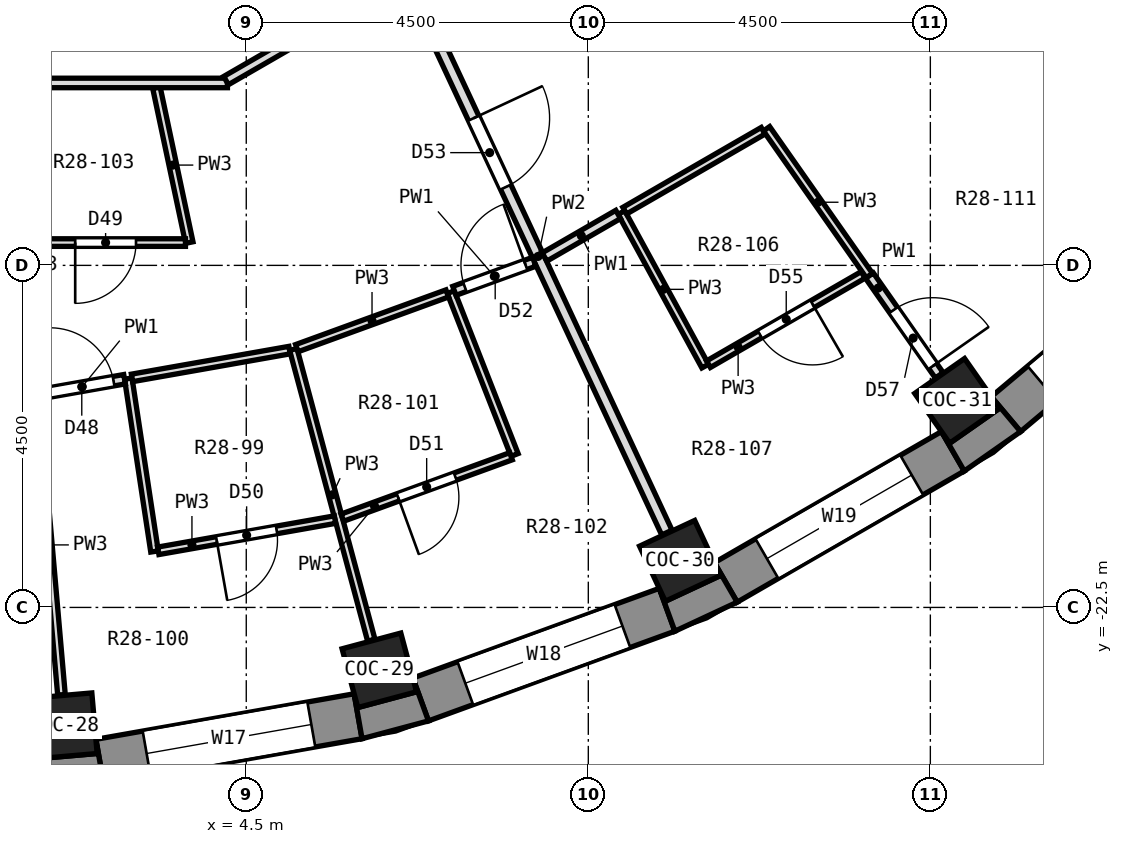
"""IFC4 building model, lengths in metres.
Left out: names, types, materials, properties, quantities, classifications, styles, units other than length and angle.
Written with IfcOpenShell. Run it as: python <this file> out.ifc"""

import sys

from ifc_helpers import new_model, si_unit, direction, frame, frame_2d, origin, origin_2d, place, context, subcontext, project, spatial, polyline, rectangle, outline, extrude, element, fill, save


model = new_model("IFC4")
c1 = context("Model", 3, precision=1e-05, world=origin(), true_north=direction((0.0, 1.0)))
c2 = subcontext(c1, "Body", "Model", "MODEL_VIEW")
j1 = project(units=[si_unit("LENGTHUNIT", "METRE"), si_unit("PLANEANGLEUNIT", "RADIAN")], contexts=[c1])
p1 = place(None, origin())
s1 = spatial("IfcSite", under=j1, at=p1, CompositionType="ELEMENT")
p2 = place(p1, origin())
s2 = spatial("IfcBuilding", under=s1, at=p2, CompositionType="ELEMENT")
p3 = place(p2, frame((0.0, 0.0, 190.5)))
s3 = spatial("IfcBuildingStorey", under=s2, at=p3, CompositionType="ELEMENT", Elevation=190.5)
for number, where, z_axis, x_axis in (
    (1, (2.105, -24.058, 0.0), (0.0, 0.0, 1.0), (0.087, -0.996, 0.0)),
    (2, (6.25, -23.327, 0.0), (0.0, 0.0, 1.0), (0.259, -0.966, 0.0)),
    (3, (10.206, -21.887, 0.0), (0.0, 0.0, 1.0), (0.423, -0.906, 0.0)),
    (4, (13.852, -19.782, 0.0), (0.0, 0.0, 1.0), (0.574, -0.819, 0.0)),
):
    element("IfcColumn", number, at=place(p3, frame(where, z_axis=z_axis, x_axis=x_axis)), inside=s3, PredefinedType="COLUMN", context=c2, shape_type="SweptSolid", body=[
        extrude(rectangle(XDim=0.8, YDim=0.8, at=origin_2d()), origin(), (0.0, 0.0, 1.0), 3.3),
    ])
p4 = place(p3, frame((2.574, -24.531, 0.0), z_axis=(0.0, 0.0, 1.0), x_axis=(0.984814892183, 0.173607684551, 0.0)))
e5 = element("IfcWall", 5, at=p4, inside=s3, PredefinedType="SOLIDWALL", context=c2, shape_type="SweptSolid", body=[
    extrude(rectangle(XDim=3.45, YDim=0.6, at=frame_2d((1.725, 0.0))), origin(), (0.0, 0.0, 1.0), 2.85),
])
p5 = place(p4, frame((0.625, 0.0, 0.9)))
e6 = element("IfcOpeningElement", 6, at=p5, cuts=e5, PredefinedType="OPENING", context=c2, shape_type="SweptSolid", body=[
    extrude(rectangle(XDim=2.2, YDim=1.8, at=frame_2d((1.1, 0.9))), frame((0.0, 0.312, 0.0), z_axis=(0.0, -1.0, 0.0), x_axis=(1.0, 0.0, 0.0)), (0.0, 0.0, 1.0), 0.624),
])
p6 = place(p3, frame((6.794, -23.711, 0.0), z_axis=(0.0, 0.0, 1.0), x_axis=(0.93968799822, 0.342032843455, 0.0)))
e7 = element("IfcWall", 7, at=p6, inside=s3, PredefinedType="SOLIDWALL", context=c2, shape_type="SweptSolid", body=[
    extrude(rectangle(XDim=3.45, YDim=0.6, at=frame_2d((1.725, 0.0))), origin(), (0.0, 0.0, 1.0), 2.85),
])
p7 = place(p6, frame((0.625, 0.0, 0.9)))
e8 = element("IfcOpeningElement", 8, at=p7, cuts=e7, PredefinedType="OPENING", context=c2, shape_type="SweptSolid", body=[
    extrude(rectangle(XDim=2.2, YDim=1.8, at=frame_2d((1.1, 0.9))), frame((0.0, 0.312, 0.0), z_axis=(0.0, -1.0, 0.0), x_axis=(1.0, 0.0, 0.0)), (0.0, 0.0, 1.0), 0.624),
])
p8 = place(p3, frame((10.809, -22.171, 0.0), z_axis=(0.0, 0.0, 1.0), x_axis=(0.86602648383, 0.499998129301, 0.0)))
e9 = element("IfcWall", 9, at=p8, inside=s3, PredefinedType="SOLIDWALL", context=c2, shape_type="SweptSolid", body=[
    extrude(rectangle(XDim=3.45, YDim=0.6, at=frame_2d((1.725, 0.0))), origin(), (0.0, 0.0, 1.0), 2.85),
])
p9 = place(p8, frame((0.625, 0.0, 0.9)))
e10 = element("IfcOpeningElement", 10, at=p9, cuts=e9, PredefinedType="OPENING", context=c2, shape_type="SweptSolid", body=[
    extrude(rectangle(XDim=2.2, YDim=1.8, at=frame_2d((1.1, 0.9))), frame((0.0, 0.312, 0.0), z_axis=(0.0, -1.0, 0.0), x_axis=(1.0, 0.0, 0.0)), (0.0, 0.0, 1.0), 0.624),
])
p10 = place(p3, frame((14.494, -19.957, 0.0), z_axis=(0.0, 0.0, 1.0), x_axis=(0.766058884809, 0.642770398358, 0.0)))
e11 = element("IfcWall", 11, at=p10, inside=s3, PredefinedType="SOLIDWALL", context=c2, shape_type="SweptSolid", body=[
    extrude(rectangle(XDim=3.449, YDim=0.6, at=frame_2d((1.725, 0.0))), origin(), (0.0, 0.0, 1.0), 2.85),
])
p11 = place(p10, frame((0.625, 0.0, 0.9)))
e12 = element("IfcOpeningElement", 12, at=p11, cuts=e11, PredefinedType="OPENING", context=c2, shape_type="SweptSolid", body=[
    extrude(rectangle(XDim=2.2, YDim=1.8, at=frame_2d((1.1, 0.9))), frame((0.0, 0.312, 0.0), z_axis=(0.0, -1.0, 0.0), x_axis=(1.0, 0.0, 0.0)), (0.0, 0.0, 1.0), 0.624),
])
p12 = place(p3, origin())
e13 = element("IfcWall", 13, at=p12, inside=s3, PredefinedType="SOLIDWALL", context=c2, shape_type="SweptSolid", body=[
    extrude(outline(polyline([(1.725, -24.905), (2.626, -24.826), (2.522, -24.235), (2.538, -24.422), (1.741, -24.491), (1.725, -24.305), (1.725, -24.905)])), origin(), (0.0, 0.0, 1.0), 2.85),
])
p13 = place(p3, origin())
e14 = element("IfcWall", 14, at=p13, inside=s3, PredefinedType="SOLIDWALL", context=c2, shape_type="SweptSolid", body=[
    extrude(outline(polyline([(6.023, -24.227), (6.897, -23.993), (6.692, -23.429), (6.74, -23.61), (5.968, -23.817), (5.919, -23.636), (6.023, -24.227)])), origin(), (0.0, 0.0, 1.0), 2.85),
])
p14 = place(p3, origin())
e15 = element("IfcWall", 15, at=p14, inside=s3, PredefinedType="SOLIDWALL", context=c2, shape_type="SweptSolid", body=[
    extrude(outline(polyline([(10.959, -22.431), (10.659, -21.911), (10.738, -22.081), (10.013, -22.419), (9.934, -22.249), (10.139, -22.813), (10.959, -22.431)])), origin(), (0.0, 0.0, 1.0), 2.85),
])
p15 = place(p3, origin())
e16 = element("IfcWall", 16, at=p15, inside=s3, PredefinedType="SOLIDWALL", context=c2, shape_type="SweptSolid", body=[
    extrude(outline(polyline([(13.946, -20.706), (14.687, -20.187), (14.302, -19.727), (14.409, -19.881), (13.754, -20.34), (13.646, -20.186), (13.946, -20.706)])), origin(), (0.0, 0.0, 1.0), 2.85),
])
p16 = place(p3, frame((1.724, -19.705, 0.0), z_axis=(0.0, 0.0, 1.0), x_axis=(0.087060633562, -0.996203014492, 0.0)))
e17 = element("IfcWall", 17, at=p16, inside=s3, PredefinedType="PARTITIONING", context=c2, shape_type="SweptSolid", body=[
    extrude(rectangle(XDim=3.96, YDim=0.1, at=frame_2d((1.98, 0.0))), origin(), (0.0, 0.0, 1.0), 2.85),
])
p17 = place(p3, frame((2.948, -19.489, 0.0), z_axis=(0.0, 0.0, 1.0), x_axis=(0.149927962289, -0.98869692329, 0.0)))
e18 = element("IfcWall", 18, at=p17, inside=s3, PredefinedType="PARTITIONING", context=c2, shape_type="SweptSolid", body=[
    extrude(rectangle(XDim=2.301, YDim=0.1, at=frame_2d((1.15, 0.0))), origin(), (0.0, 0.0, 1.0), 2.85),
])
p18 = place(p3, frame((3.318, -15.661, 0.0), z_axis=(0.0, 0.0, 1.0), x_axis=(0.207344548251, -0.978267978782, 0.0)))
e19 = element("IfcWall", 19, at=p18, inside=s3, PredefinedType="PARTITIONING", context=c2, shape_type="SweptSolid", body=[
    extrude(rectangle(XDim=2.084, YDim=0.1, at=frame_2d((1.042, 0.0))), origin(), (0.0, 0.0, 1.0), 2.85),
])
p19 = place(p3, frame((5.119, -19.106, 0.0), z_axis=(0.0, 0.0, 1.0), x_axis=(0.259051417791, -0.965863532255, 0.0)))
e20 = element("IfcWall", 20, at=p19, inside=s3, PredefinedType="PARTITIONING", context=c2, shape_type="SweptSolid", body=[
    extrude(rectangle(XDim=3.96, YDim=0.1, at=frame_2d((1.98, 0.0))), origin(), (0.0, 0.0, 1.0), 2.85),
])
p20 = place(p3, frame((7.191, -18.352, 0.0), z_axis=(0.0, 0.0, 1.0), x_axis=(0.364775478286, -0.931095510912, 0.0)))
e21 = element("IfcWall", 21, at=p20, inside=s3, PredefinedType="PARTITIONING", context=c2, shape_type="SweptSolid", body=[
    extrude(rectangle(XDim=2.3, YDim=0.1, at=frame_2d((1.15, 0.0))), origin(), (0.0, 0.0, 1.0), 2.85),
])
p21 = place(p3, frame((6.645, -14.249, 0.0), z_axis=(0.0, 0.0, 1.0), x_axis=(0.422700425591, -0.90626946887, 0.0)))
e22 = element("IfcWall", 22, at=p21, inside=s3, PredefinedType="PARTITIONING", context=c2, shape_type="SweptSolid", body=[
    extrude(rectangle(XDim=8.018, YDim=0.15, at=frame_2d((4.009, 0.0))), origin(), (0.0, 0.0, 1.0), 2.85),
])
p22 = place(p21, frame((2.002, 0.0, 0.0)))
e23 = element("IfcOpeningElement", 23, at=p22, cuts=e22, PredefinedType="OPENING", context=c2, shape_type="SweptSolid", body=[
    extrude(rectangle(XDim=1.0, YDim=2.1, at=frame_2d((0.5, 1.05))), frame((0.0, 0.087, 0.0), z_axis=(0.0, -1.0, 0.0), x_axis=(1.0, 0.0, 0.0)), (0.0, 0.0, 1.0), 0.174),
])
p23 = place(p3, frame((9.436, -17.305, 0.0), z_axis=(0.0, 0.0, 1.0), x_axis=(0.478926465157, -0.877855022753, 0.0)))
e24 = element("IfcWall", 24, at=p23, inside=s3, PredefinedType="PARTITIONING", context=c2, shape_type="SweptSolid", body=[
    extrude(rectangle(XDim=2.301, YDim=0.1, at=frame_2d((1.15, 0.0))), origin(), (0.0, 0.0, 1.0), 2.85),
])
p24 = place(p3, frame((11.345, -16.203, 0.0), z_axis=(0.0, 0.0, 1.0), x_axis=(0.573823443789, -0.818979032307, 0.0)))
e25 = element("IfcWall", 25, at=p24, inside=s3, PredefinedType="PARTITIONING", context=c2, shape_type="SweptSolid", body=[
    extrude(rectangle(XDim=2.359, YDim=0.1, at=frame_2d((1.18, 0.0))), origin(), (0.0, 0.0, 1.0), 2.85),
])
p25 = place(p3, frame((12.699, -18.135, 0.0), z_axis=(0.0, 0.0, 1.0), x_axis=(0.57352374907, -0.819188933795, 0.0)))
e26 = element("IfcWall", 26, at=p25, inside=s3, PredefinedType="PARTITIONING", context=c2, shape_type="SweptSolid", body=[
    extrude(rectangle(XDim=1.601, YDim=0.125, at=frame_2d((0.801, 0.0))), origin(), (0.0, 0.0, 1.0), 2.85),
])
p26 = place(p25, frame((0.553, 0.0, 0.0)))
e27 = element("IfcOpeningElement", 27, at=p26, cuts=e26, PredefinedType="OPENING", context=c2, shape_type="SweptSolid", body=[
    extrude(rectangle(XDim=0.9, YDim=2.1, at=frame_2d((0.45, 1.05))), frame((0.0, 0.074, 0.0), z_axis=(0.0, -1.0, 0.0), x_axis=(1.0, 0.0, 0.0)), (0.0, 0.0, 1.0), 0.149),
])
p27 = place(p3, frame((13.987, -13.987, 0.0), z_axis=(0.0, 0.0, 1.0), x_axis=(0.707106781187, -0.707106781187, 0.0)))
e28 = element("IfcWall", 28, at=p27, inside=s3, PredefinedType="PARTITIONING", context=c2, shape_type="SweptSolid", body=[
    extrude(rectangle(XDim=3.959, YDim=0.125, at=frame_2d((1.979, 0.0))), origin(), (0.0, 0.0, 1.0), 2.85),
])
p28 = place(p27, frame((1.859, 0.0, 0.0)))
e29 = element("IfcOpeningElement", 29, at=p28, cuts=e28, PredefinedType="OPENING", context=c2, shape_type="SweptSolid", body=[
    extrude(rectangle(XDim=0.9, YDim=2.1, at=frame_2d((0.45, 1.05))), frame((0.0, 0.074, 0.0), z_axis=(0.0, -1.0, 0.0), x_axis=(1.0, 0.0, 0.0)), (0.0, 0.0, 1.0), 0.149),
])
p29 = place(p3, frame((1.599, -17.7, 0.0), z_axis=(0.0, 0.0, 1.0), x_axis=(1.0, 0.0, 0.0)))
e30 = element("IfcWall", 30, at=p29, inside=s3, PredefinedType="PARTITIONING", context=c2, shape_type="SweptSolid", body=[
    extrude(rectangle(XDim=2.101, YDim=0.1, at=frame_2d((1.05, 0.0))), origin(), (0.0, 0.0, 1.0), 2.85),
])
p30 = place(p29, frame((0.65, 0.0, 0.0)))
e31 = element("IfcOpeningElement", 31, at=p30, cuts=e30, PredefinedType="OPENING", context=c2, shape_type="SweptSolid", body=[
    extrude(rectangle(XDim=0.8, YDim=2.1, at=frame_2d((0.4, 1.05))), frame((0.0, 0.062, 0.0), z_axis=(0.0, -1.0, 0.0), x_axis=(1.0, 0.0, 0.0)), (0.0, 0.0, 1.0), 0.124),
])
p31 = place(p3, frame((-4.117, -15.6, 0.0), z_axis=(0.0, 0.0, 1.0), x_axis=(1.0, 0.0, 0.0)))
e32 = element("IfcWall", 32, at=p31, inside=s3, PredefinedType="PARTITIONING", context=c2, shape_type="SweptSolid", body=[
    extrude(rectangle(XDim=8.37, YDim=0.125, at=frame_2d((4.185, 0.0))), origin(), (0.0, 0.0, 1.0), 2.85),
])
p32 = place(p31, frame((3.273, 0.0, 0.0)))
e33 = element("IfcOpeningElement", 33, at=p32, cuts=e32, PredefinedType="OPENING", context=c2, shape_type="SweptSolid", body=[
    extrude(rectangle(XDim=1.0, YDim=2.1, at=frame_2d((0.5, 1.05))), frame((0.0, 0.074, 0.0), z_axis=(0.0, -1.0, 0.0), x_axis=(1.0, 0.0, 0.0)), (0.0, 0.0, 1.0), 0.149),
])
p33 = place(p3, frame((3.342, -21.755, 0.0), z_axis=(0.0, 0.0, 1.0), x_axis=(0.984763777024, 0.173897393486, 0.0)))
e34 = element("IfcWall", 34, at=p33, inside=s3, PredefinedType="PARTITIONING", context=c2, shape_type="SweptSolid", body=[
    extrude(rectangle(XDim=2.361, YDim=0.1, at=frame_2d((1.181, 0.0))), origin(), (0.0, 0.0, 1.0), 2.85),
])
p34 = place(p33, frame((0.781, 0.0, 0.0)))
e35 = element("IfcOpeningElement", 35, at=p34, cuts=e34, PredefinedType="OPENING", context=c2, shape_type="SweptSolid", body=[
    extrude(rectangle(XDim=0.8, YDim=2.1, at=frame_2d((0.4, 1.05))), frame((0.0, 0.062, 0.0), z_axis=(0.0, -1.0, 0.0), x_axis=(1.0, 0.0, 0.0)), (0.0, 0.0, 1.0), 0.124),
])
p35 = place(p3, frame((2.997, -19.48, 0.0), z_axis=(0.0, 0.0, 1.0), x_axis=(0.984804573467, 0.173666208797, 0.0)))
e36 = element("IfcWall", 36, at=p35, inside=s3, PredefinedType="PARTITIONING", context=c2, shape_type="SweptSolid", body=[
    extrude(rectangle(XDim=2.104, YDim=0.1, at=frame_2d((1.052, 0.0))), origin(), (0.0, 0.0, 1.0), 2.85),
])
p36 = place(p3, frame((1.786, -19.694, 0.0), z_axis=(0.0, 0.0, 1.0), x_axis=(0.984803124218, 0.17367442682, 0.0)))
e37 = element("IfcWall", 37, at=p36, inside=s3, PredefinedType="PARTITIONING", context=c2, shape_type="SweptSolid", body=[
    extrude(rectangle(XDim=1.13, YDim=0.125, at=frame_2d((0.565, 0.0))), origin(), (0.0, 0.0, 1.0), 2.85),
])
p37 = place(p36, frame((0.134, 0.0, 0.0)))
e38 = element("IfcOpeningElement", 38, at=p37, cuts=e37, PredefinedType="OPENING", context=c2, shape_type="SweptSolid", body=[
    extrude(rectangle(XDim=0.85, YDim=2.1, at=frame_2d((0.425, 1.05))), frame((0.0, 0.074, 0.0), z_axis=(0.0, -1.0, 0.0), x_axis=(1.0, 0.0, 0.0)), (0.0, 0.0, 1.0), 0.149),
])
p38 = place(p3, frame((5.764, -21.319, 0.0), z_axis=(0.0, 0.0, 1.0), x_axis=(0.939663558851, 0.342099979782, 0.0)))
e39 = element("IfcWall", 39, at=p38, inside=s3, PredefinedType="PARTITIONING", context=c2, shape_type="SweptSolid", body=[
    extrude(rectangle(XDim=2.362, YDim=0.1, at=frame_2d((1.181, 0.0))), origin(), (0.0, 0.0, 1.0), 2.85),
])
p39 = place(p38, frame((0.781, 0.0, 0.0)))
e40 = element("IfcOpeningElement", 40, at=p39, cuts=e39, PredefinedType="OPENING", context=c2, shape_type="SweptSolid", body=[
    extrude(rectangle(XDim=0.8, YDim=2.1, at=frame_2d((0.4, 1.05))), frame((0.0, 0.062, 0.0), z_axis=(0.0, -1.0, 0.0), x_axis=(1.0, 0.0, 0.0)), (0.0, 0.0, 1.0), 0.124),
])
p40 = place(p3, frame((5.166, -19.089, 0.0), z_axis=(0.0, 0.0, 1.0), x_axis=(0.939725675468, 0.341929312674, 0.0)))
e41 = element("IfcWall", 41, at=p40, inside=s3, PredefinedType="PARTITIONING", context=c2, shape_type="SweptSolid", body=[
    extrude(rectangle(XDim=2.105, YDim=0.1, at=frame_2d((1.052, 0.0))), origin(), (0.0, 0.0, 1.0), 2.85),
])
p41 = place(p3, frame((7.238, -18.335, 0.0), z_axis=(0.0, 0.0, 1.0), x_axis=(0.939704125186, 0.341988533591, 0.0)))
e42 = element("IfcWall", 42, at=p41, inside=s3, PredefinedType="PARTITIONING", context=c2, shape_type="SweptSolid", body=[
    extrude(rectangle(XDim=1.118, YDim=0.125, at=frame_2d((0.559, 0.0))), origin(), (0.0, 0.0, 1.0), 2.85),
])
p42 = place(p41, frame((0.146, 0.0, 0.0)))
e43 = element("IfcOpeningElement", 43, at=p42, cuts=e42, PredefinedType="OPENING", context=c2, shape_type="SweptSolid", body=[
    extrude(rectangle(XDim=0.85, YDim=2.1, at=frame_2d((0.425, 1.05))), frame((0.0, 0.074, 0.0), z_axis=(0.0, -1.0, 0.0), x_axis=(1.0, 0.0, 0.0)), (0.0, 0.0, 1.0), 0.149),
])
p43 = place(p3, frame((10.581, -19.3, 0.0), z_axis=(0.0, 0.0, 1.0), x_axis=(0.866009076391, 0.500028278809, 0.0)))
e44 = element("IfcWall", 44, at=p43, inside=s3, PredefinedType="PARTITIONING", context=c2, shape_type="SweptSolid", body=[
    extrude(rectangle(XDim=2.349, YDim=0.1, at=frame_2d((1.175, 0.0))), origin(), (0.0, 0.0, 1.0), 2.85),
])
p44 = place(p43, frame((0.781, 0.0, 0.0)))
e45 = element("IfcOpeningElement", 45, at=p44, cuts=e44, PredefinedType="OPENING", context=c2, shape_type="SweptSolid", body=[
    extrude(rectangle(XDim=0.8, YDim=2.1, at=frame_2d((0.4, 1.05))), frame((0.0, 0.062, 0.0), z_axis=(0.0, -1.0, 0.0), x_axis=(1.0, 0.0, 0.0)), (0.0, 0.0, 1.0), 0.124),
])
p45 = place(p3, frame((9.479, -17.28, 0.0), z_axis=(0.0, 0.0, 1.0), x_axis=(0.86606956535, 0.499923502123, 0.0)))
e46 = element("IfcWall", 46, at=p45, inside=s3, PredefinedType="PARTITIONING", context=c2, shape_type="SweptSolid", body=[
    extrude(rectangle(XDim=2.102, YDim=0.1, at=frame_2d((1.051, 0.0))), origin(), (0.0, 0.0, 1.0), 2.85),
])
p46 = place(p3, frame((8.424, -17.889, 0.0), z_axis=(0.0, 0.0, 1.0), x_axis=(0.86607294768, 0.499917642513, 0.0)))
e47 = element("IfcWall", 47, at=p46, inside=s3, PredefinedType="PARTITIONING", context=c2, shape_type="SweptSolid", body=[
    extrude(rectangle(XDim=1.119, YDim=0.125, at=frame_2d((0.56, 0.0))), origin(), (0.0, 0.0, 1.0), 2.85),
])
p47 = place(p3, frame((4.234, -15.569, 0.0), z_axis=(0.0, 0.0, 1.0), x_axis=(0.866024799292, 0.50000104701, 0.0)))
e48 = element("IfcWall", 48, at=p47, inside=s3, PredefinedType="PARTITIONING", context=c2, shape_type="SweptSolid", body=[
    extrude(rectangle(XDim=8.37, YDim=0.125, at=frame_2d((4.185, 0.0))), origin(), (0.0, 0.0, 1.0), 2.85),
])
p48 = place(p5, origin())
e49 = element("IfcWindow", 49, at=p48, inside=s3, PartitioningType="SINGLE_PANEL", PredefinedType="WINDOW", context=c2, shape_type="SweptSolid", body=[
    extrude(rectangle(XDim=2.2, YDim=1.8, at=frame_2d((1.1, 0.9))), frame((0.0, 0.18, 0.0), z_axis=(0.0, -1.0, 0.0), x_axis=(1.0, 0.0, 0.0)), (0.0, 0.0, 1.0), 0.06),
])
fill(e6, e49)
p49 = place(p7, origin())
e50 = element("IfcWindow", 50, at=p49, inside=s3, PartitioningType="SINGLE_PANEL", PredefinedType="WINDOW", context=c2, shape_type="SweptSolid", body=[
    extrude(rectangle(XDim=2.2, YDim=1.8, at=frame_2d((1.1, 0.9))), frame((0.0, 0.18, 0.0), z_axis=(0.0, -1.0, 0.0), x_axis=(1.0, 0.0, 0.0)), (0.0, 0.0, 1.0), 0.06),
])
fill(e8, e50)
p50 = place(p9, origin())
e51 = element("IfcWindow", 51, at=p50, inside=s3, PartitioningType="SINGLE_PANEL", PredefinedType="WINDOW", context=c2, shape_type="SweptSolid", body=[
    extrude(rectangle(XDim=2.2, YDim=1.8, at=frame_2d((1.1, 0.9))), frame((0.0, 0.18, 0.0), z_axis=(0.0, -1.0, 0.0), x_axis=(1.0, 0.0, 0.0)), (0.0, 0.0, 1.0), 0.06),
])
fill(e10, e51)
p51 = place(p11, origin())
e52 = element("IfcWindow", 52, at=p51, inside=s3, PartitioningType="SINGLE_PANEL", PredefinedType="WINDOW", context=c2, shape_type="SweptSolid", body=[
    extrude(rectangle(XDim=2.2, YDim=1.8, at=frame_2d((1.1, 0.9))), frame((0.0, 0.18, 0.0), z_axis=(0.0, -1.0, 0.0), x_axis=(1.0, 0.0, 0.0)), (0.0, 0.0, 1.0), 0.06),
])
fill(e12, e52)
p52 = place(p37, origin())
e53 = element("IfcDoor", 53, at=p52, inside=s3, OperationType="SINGLE_SWING_LEFT", PredefinedType="DOOR", context=c2, shape_type="SweptSolid", body=[
    extrude(rectangle(XDim=0.85, YDim=2.1, at=frame_2d((0.425, 1.05))), frame((0.0, 0.025, 0.0), z_axis=(0.0, -1.0, 0.0), x_axis=(1.0, 0.0, 0.0)), (0.0, 0.0, 1.0), 0.05),
])
fill(e38, e53)
p53 = place(p30, frame((0.8, 0.0, 0.0), z_axis=(0.0, 0.0, 1.0), x_axis=(-1.0, 0.0, 0.0)))
e54 = element("IfcDoor", 54, at=p53, inside=s3, OperationType="SINGLE_SWING_RIGHT", PredefinedType="DOOR", context=c2, shape_type="SweptSolid", body=[
    extrude(rectangle(XDim=0.8, YDim=2.1, at=frame_2d((0.4, 1.05))), frame((0.0, 0.025, 0.0), z_axis=(0.0, -1.0, 0.0), x_axis=(1.0, 0.0, 0.0)), (0.0, 0.0, 1.0), 0.05),
])
fill(e31, e54)
p54 = place(p34, frame((0.8, 0.0, 0.0), z_axis=(0.0, 0.0, 1.0), x_axis=(-1.0, 0.0, 0.0)))
e55 = element("IfcDoor", 55, at=p54, inside=s3, OperationType="SINGLE_SWING_RIGHT", PredefinedType="DOOR", context=c2, shape_type="SweptSolid", body=[
    extrude(rectangle(XDim=0.8, YDim=2.1, at=frame_2d((0.4, 1.05))), frame((0.0, 0.025, 0.0), z_axis=(0.0, -1.0, 0.0), x_axis=(1.0, 0.0, 0.0)), (0.0, 0.0, 1.0), 0.05),
])
fill(e35, e55)
p55 = place(p39, frame((0.8, 0.0, 0.0), z_axis=(0.0, 0.0, 1.0), x_axis=(-1.0, 0.0, 0.0)))
e56 = element("IfcDoor", 56, at=p55, inside=s3, OperationType="SINGLE_SWING_RIGHT", PredefinedType="DOOR", context=c2, shape_type="SweptSolid", body=[
    extrude(rectangle(XDim=0.8, YDim=2.1, at=frame_2d((0.4, 1.05))), frame((0.0, 0.025, 0.0), z_axis=(0.0, -1.0, 0.0), x_axis=(1.0, 0.0, 0.0)), (0.0, 0.0, 1.0), 0.05),
])
fill(e40, e56)
p56 = place(p42, origin())
e57 = element("IfcDoor", 57, at=p56, inside=s3, OperationType="SINGLE_SWING_RIGHT", PredefinedType="DOOR", context=c2, shape_type="SweptSolid", body=[
    extrude(rectangle(XDim=0.85, YDim=2.1, at=frame_2d((0.425, 1.05))), frame((0.0, 0.025, 0.0), z_axis=(0.0, -1.0, 0.0), x_axis=(1.0, 0.0, 0.0)), (0.0, 0.0, 1.0), 0.05),
])
fill(e43, e57)
p57 = place(p22, origin())
e58 = element("IfcDoor", 58, at=p57, inside=s3, OperationType="SINGLE_SWING_LEFT", PredefinedType="DOOR", context=c2, shape_type="SweptSolid", body=[
    extrude(rectangle(XDim=1.0, YDim=2.1, at=frame_2d((0.5, 1.05))), frame((0.0, 0.025, 0.0), z_axis=(0.0, -1.0, 0.0), x_axis=(1.0, 0.0, 0.0)), (0.0, 0.0, 1.0), 0.05),
])
fill(e23, e58)
p58 = place(p44, frame((0.8, 0.0, 0.0), z_axis=(0.0, 0.0, 1.0), x_axis=(-1.0, 0.0, 0.0)))
e59 = element("IfcDoor", 59, at=p58, inside=s3, OperationType="SINGLE_SWING_LEFT", PredefinedType="DOOR", context=c2, shape_type="SweptSolid", body=[
    extrude(rectangle(XDim=0.8, YDim=2.1, at=frame_2d((0.4, 1.05))), frame((0.0, 0.025, 0.0), z_axis=(0.0, -1.0, 0.0), x_axis=(1.0, 0.0, 0.0)), (0.0, 0.0, 1.0), 0.05),
])
fill(e45, e59)
p59 = place(p26, origin())
e60 = element("IfcDoor", 60, at=p59, inside=s3, OperationType="SINGLE_SWING_RIGHT", PredefinedType="DOOR", context=c2, shape_type="SweptSolid", body=[
    extrude(rectangle(XDim=0.9, YDim=2.1, at=frame_2d((0.45, 1.05))), frame((0.0, 0.025, 0.0), z_axis=(0.0, -1.0, 0.0), x_axis=(1.0, 0.0, 0.0)), (0.0, 0.0, 1.0), 0.05),
])
fill(e27, e60)
save(model, sys.argv[1])
